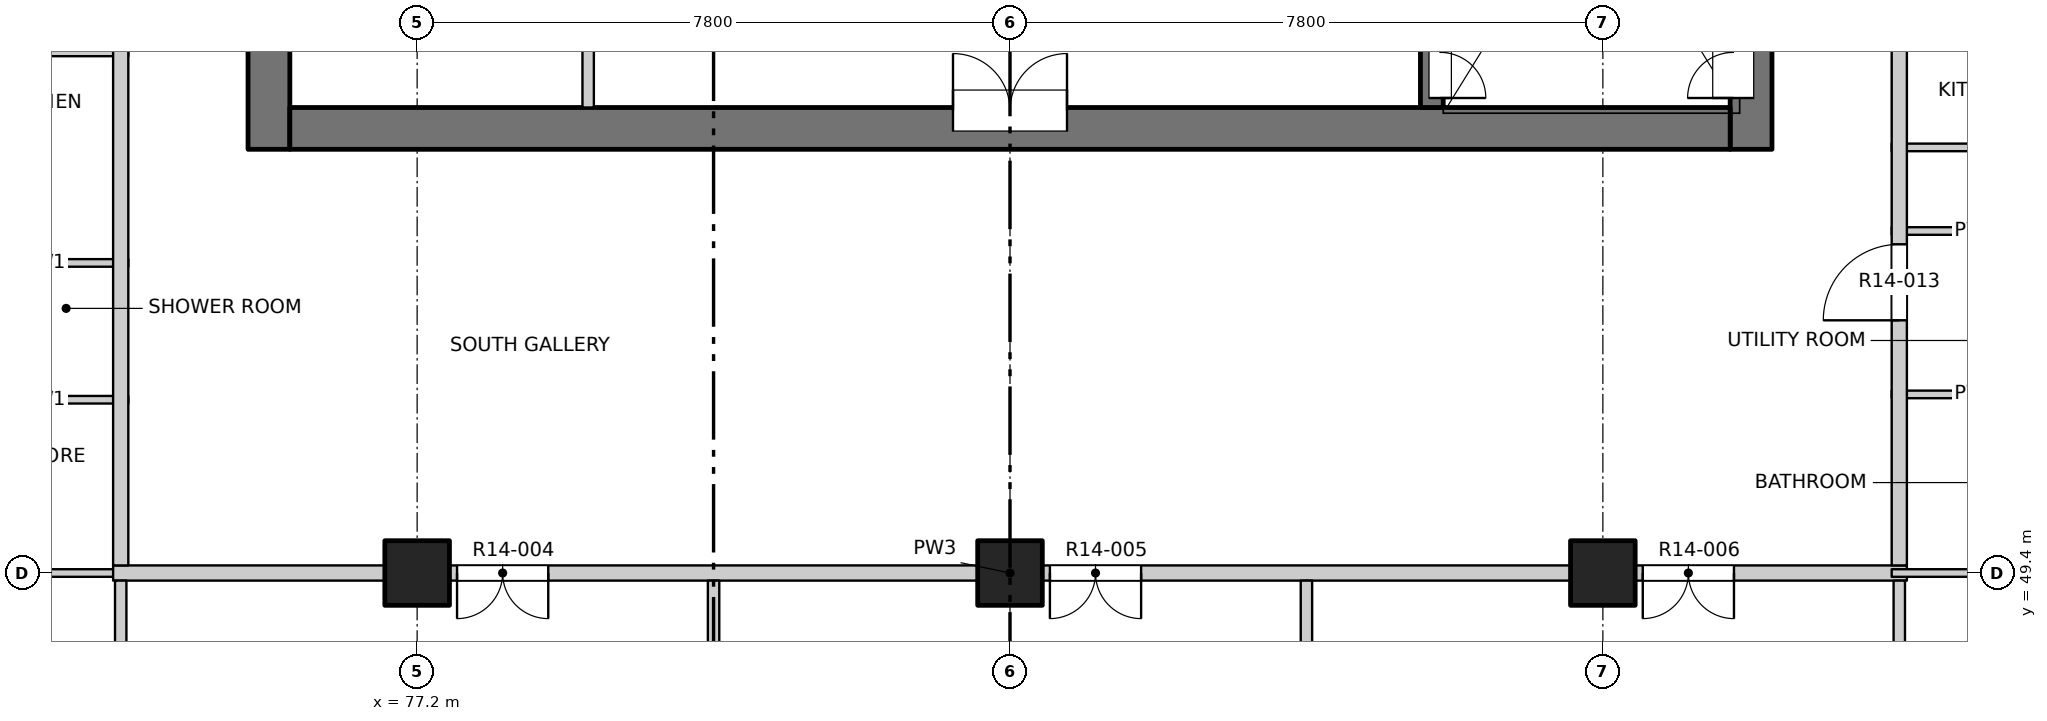
"""IFC4 building model, lengths in metres.
Left out: names, types, materials, properties, quantities, classifications, styles, units other than length and angle.
Written with IfcOpenShell. Run it as: python <this file> out.ifc"""

import sys

from ifc_helpers import new_model, si_unit, direction, frame, frame_2d, origin, origin_2d, place, context, subcontext, project, spatial, rectangle, extrude, element, fill, save


model = new_model("IFC4")
c1 = context("Model", 3, precision=1e-05, world=origin(), true_north=direction((0.0, 1.0)))
c2 = subcontext(c1, "Body", "Model", "MODEL_VIEW")
j1 = project(units=[si_unit("LENGTHUNIT", "METRE"), si_unit("PLANEANGLEUNIT", "RADIAN")], contexts=[c1])
p1 = place(None, origin())
s1 = spatial("IfcSite", under=j1, at=p1, CompositionType="ELEMENT")
p2 = place(p1, origin())
s2 = spatial("IfcBuilding", under=s1, at=p2, CompositionType="ELEMENT")
p3 = place(p2, frame((0.0, 0.0, 152.0)))
s3 = spatial("IfcBuildingStorey", under=s2, at=p3, CompositionType="ELEMENT", Elevation=152.0)
for number, where, z_axis, x_axis in (
    (1, (77.2, 49.4, -0.25), (0.0, 0.0, 1.0), (1.0, 0.0, 0.0)),
    (2, (85.0, 49.4, -0.25), (0.0, 0.0, 1.0), (1.0, 0.0, 0.0)),
    (3, (92.8, 49.4, -0.25), (0.0, 0.0, 1.0), (1.0, 0.0, 0.0)),
):
    element("IfcColumn", number, at=place(p3, frame(where, z_axis=z_axis, x_axis=x_axis)), inside=s3, PredefinedType="COLUMN", context=c2, shape_type="SweptSolid", body=[
        extrude(rectangle(XDim=0.85, YDim=0.85, at=origin_2d()), origin(), (0.0, 0.0, 1.0), 3.4),
    ])
p4 = place(p3, frame((75.25, 54.975, -0.25), z_axis=(0.0, 0.0, 1.0), x_axis=(0.0, 1.0, 0.0)))
e4 = element("IfcWall", 4, at=p4, inside=s3, PredefinedType="SOLIDWALL", context=c2, shape_type="SweptSolid", body=[
    extrude(rectangle(XDim=22.325, YDim=0.55, at=frame_2d((11.163, 0.0))), origin(), (0.0, 0.0, 1.0), 3.4),
])
p5 = place(p4, frame((7.475, 0.0, 0.25)))
e5 = element("IfcOpeningElement", 5, at=p5, cuts=e4, PredefinedType="OPENING", context=c2, shape_type="SweptSolid", body=[
    extrude(rectangle(XDim=0.9, YDim=2.1, at=frame_2d((0.45, 1.05))), frame((0.0, 0.285, 0.0), z_axis=(0.0, -1.0, 0.0), x_axis=(1.0, 0.0, 0.0)), (0.0, 0.0, 1.0), 0.57),
])
p6 = place(p4, frame((13.775, 0.0, 0.25)))
e6 = element("IfcOpeningElement", 6, at=p6, cuts=e4, PredefinedType="OPENING", context=c2, shape_type="SweptSolid", body=[
    extrude(rectangle(XDim=0.9, YDim=2.1, at=frame_2d((0.45, 1.05))), frame((0.0, 0.285, 0.0), z_axis=(0.0, -1.0, 0.0), x_axis=(1.0, 0.0, 0.0)), (0.0, 0.0, 1.0), 0.57),
])
p7 = place(p4, frame((20.075, 0.0, 0.25)))
e7 = element("IfcOpeningElement", 7, at=p7, cuts=e4, PredefinedType="OPENING", context=c2, shape_type="SweptSolid", body=[
    extrude(rectangle(XDim=0.9, YDim=2.1, at=frame_2d((0.45, 1.05))), frame((0.0, 0.285, 0.0), z_axis=(0.0, -1.0, 0.0), x_axis=(1.0, 0.0, 0.0)), (0.0, 0.0, 1.0), 0.57),
])
p8 = place(p3, frame((94.75, 54.975, -0.25), z_axis=(0.0, 0.0, 1.0), x_axis=(0.0, 1.0, 0.0)))
e8 = element("IfcWall", 8, at=p8, inside=s3, PredefinedType="SOLIDWALL", context=c2, shape_type="SweptSolid", body=[
    extrude(rectangle(XDim=6.975, YDim=0.55, at=frame_2d((3.487, 0.0))), origin(), (0.0, 0.0, 1.0), 3.4),
])
p9 = place(p8, frame((0.675, 0.0, 0.25)))
e9 = element("IfcOpeningElement", 9, at=p9, cuts=e8, PredefinedType="OPENING", context=c2, shape_type="SweptSolid", body=[
    extrude(rectangle(XDim=1.2, YDim=2.1, at=frame_2d((0.6, 1.05))), frame((0.0, 0.285, 0.0), z_axis=(0.0, -1.0, 0.0), x_axis=(1.0, 0.0, 0.0)), (0.0, 0.0, 1.0), 0.57),
])
p10 = place(p3, frame((75.525, 55.25, -0.25), z_axis=(0.0, 0.0, 1.0), x_axis=(1.0, 0.0, 0.0)))
e10 = element("IfcWall", 10, at=p10, inside=s3, PredefinedType="SOLIDWALL", context=c2, shape_type="SweptSolid", body=[
    extrude(rectangle(XDim=18.95, YDim=0.55, at=frame_2d((9.475, 0.0))), origin(), (0.0, 0.0, 1.0), 3.4),
])
p11 = place(p10, frame((8.725, 0.0, 0.25)))
e11 = element("IfcOpeningElement", 11, at=p11, cuts=e10, PredefinedType="OPENING", context=c2, shape_type="SweptSolid", body=[
    extrude(rectangle(XDim=1.5, YDim=2.1, at=frame_2d((0.75, 1.05))), frame((0.0, 0.285, 0.0), z_axis=(0.0, -1.0, 0.0), x_axis=(1.0, 0.0, 0.0)), (0.0, 0.0, 1.0), 0.57),
])
p12 = place(p3, frame((90.55, 55.525, -0.25), z_axis=(0.0, 0.0, 1.0), x_axis=(0.0, 1.0, 0.0)))
e12 = element("IfcWall", 12, at=p12, inside=s3, PredefinedType="SOLIDWALL", context=c2, shape_type="SweptSolid", body=[
    extrude(rectangle(XDim=6.425, YDim=0.3, at=frame_2d((3.212, 0.0))), origin(), (0.0, 0.0, 1.0), 3.4),
])
p13 = place(p12, frame((0.125, 0.0, 0.25)))
e13 = element("IfcOpeningElement", 13, at=p13, cuts=e12, PredefinedType="OPENING", context=c2, shape_type="SweptSolid", body=[
    extrude(rectangle(XDim=1.2, YDim=2.1, at=frame_2d((0.6, 1.05))), frame((0.0, 0.16, 0.0), z_axis=(0.0, -1.0, 0.0), x_axis=(1.0, 0.0, 0.0)), (0.0, 0.0, 1.0), 0.32),
])
p14 = place(p3, frame((65.8, 49.4, 0.0), z_axis=(0.0, 0.0, 1.0), x_axis=(1.0, 0.0, 0.0)))
e14 = element("IfcWall", 14, at=p14, inside=s3, PredefinedType="PARTITIONING", context=c2, shape_type="SweptSolid", body=[
    extrude(rectangle(XDim=7.6, YDim=0.1, at=frame_2d((3.8, 0.0))), origin(), (0.0, 0.0, 1.0), 3.15),
])
p15 = place(p14, frame((4.14, 0.0, 0.0)))
e15 = element("IfcOpeningElement", 15, at=p15, cuts=e14, PredefinedType="OPENING", context=c2, shape_type="SweptSolid", body=[
    extrude(rectangle(XDim=0.9, YDim=2.1, at=frame_2d((0.45, 1.05))), frame((0.0, 0.06, 0.0), z_axis=(0.0, -1.0, 0.0), x_axis=(1.0, 0.0, 0.0)), (0.0, 0.0, 1.0), 0.12),
])
p16 = place(p3, frame((73.2, 49.4, 0.0), z_axis=(0.0, 0.0, 1.0), x_axis=(1.0, 0.0, 0.0)))
e16 = element("IfcWall", 16, at=p16, inside=s3, PredefinedType="PARTITIONING", context=c2, shape_type="SweptSolid", body=[
    extrude(rectangle(XDim=23.6, YDim=0.2, at=frame_2d((11.8, 0.0))), origin(), (0.0, 0.0, 1.0), 3.15),
])
p17 = place(p16, frame((4.525, 0.0, 0.0)))
e17 = element("IfcOpeningElement", 17, at=p17, cuts=e16, PredefinedType="OPENING", context=c2, shape_type="SweptSolid", body=[
    extrude(rectangle(XDim=1.2, YDim=2.1, at=frame_2d((0.6, 1.05))), frame((0.0, 0.11, 0.0), z_axis=(0.0, -1.0, 0.0), x_axis=(1.0, 0.0, 0.0)), (0.0, 0.0, 1.0), 0.22),
])
p18 = place(p16, frame((12.325, 0.0, 0.0)))
e18 = element("IfcOpeningElement", 18, at=p18, cuts=e16, PredefinedType="OPENING", context=c2, shape_type="SweptSolid", body=[
    extrude(rectangle(XDim=1.2, YDim=2.1, at=frame_2d((0.6, 1.05))), frame((0.0, 0.11, 0.0), z_axis=(0.0, -1.0, 0.0), x_axis=(1.0, 0.0, 0.0)), (0.0, 0.0, 1.0), 0.22),
])
p19 = place(p16, frame((20.125, 0.0, 0.0)))
e19 = element("IfcOpeningElement", 19, at=p19, cuts=e16, PredefinedType="OPENING", context=c2, shape_type="SweptSolid", body=[
    extrude(rectangle(XDim=1.2, YDim=2.1, at=frame_2d((0.6, 1.05))), frame((0.0, 0.11, 0.0), z_axis=(0.0, -1.0, 0.0), x_axis=(1.0, 0.0, 0.0)), (0.0, 0.0, 1.0), 0.22),
])
p20 = place(p3, frame((96.6, 49.4, 0.0), z_axis=(0.0, 0.0, 1.0), x_axis=(1.0, 0.0, 0.0)))
e20 = element("IfcWall", 20, at=p20, inside=s3, PredefinedType="PARTITIONING", context=c2, shape_type="SweptSolid", body=[
    extrude(rectangle(XDim=7.6, YDim=0.1, at=frame_2d((3.8, 0.0))), origin(), (0.0, 0.0, 1.0), 3.15),
])
p21 = place(p20, frame((2.56, 0.0, 0.0)))
e21 = element("IfcOpeningElement", 21, at=p21, cuts=e20, PredefinedType="OPENING", context=c2, shape_type="SweptSolid", body=[
    extrude(rectangle(XDim=0.9, YDim=2.1, at=frame_2d((0.45, 1.05))), frame((0.0, 0.06, 0.0), z_axis=(0.0, -1.0, 0.0), x_axis=(1.0, 0.0, 0.0)), (0.0, 0.0, 1.0), 0.12),
])
for number, where, z_axis, x_axis in (
    (22, (71.18, 51.68, 0.0), (0.0, 0.0, 1.0), (1.0, 0.0, 0.0)),
    (23, (96.6, 51.75, 0.0), (0.0, 0.0, 1.0), (1.0, 0.0, 0.0)),
    (24, (71.18, 53.48, 0.0), (0.0, 0.0, 1.0), (1.0, 0.0, 0.0)),
    (25, (96.6, 53.9, 0.0), (0.0, 0.0, 1.0), (1.0, 0.0, 0.0)),
    (26, (96.6, 55.0, 0.0), (0.0, 0.0, 1.0), (1.0, 0.0, 0.0)),
    (27, (71.18, 56.25, 0.0), (0.0, 0.0, 1.0), (1.0, 0.0, 0.0)),
):
    element("IfcWall", number, at=place(p3, frame(where, z_axis=z_axis, x_axis=x_axis)), inside=s3, PredefinedType="PARTITIONING", context=c2, shape_type="SweptSolid", body=[
        extrude(rectangle(XDim=2.22, YDim=0.1, at=frame_2d((1.11, 0.0))), origin(), (0.0, 0.0, 1.0), 3.15),
    ])
p22 = place(p3, frame((73.3, 45.8, 0.0), z_axis=(0.0, 0.0, 1.0), x_axis=(0.0, 1.0, 0.0)))
e28 = element("IfcWall", 28, at=p22, inside=s3, PredefinedType="PARTITIONING", context=c2, shape_type="SweptSolid", body=[
    extrude(rectangle(XDim=3.5, YDim=0.15, at=frame_2d((1.75, 0.0))), origin(), (0.0, 0.0, 1.0), 3.15),
])
p23 = place(p3, frame((73.3, 49.5, 0.0), z_axis=(0.0, 0.0, 1.0), x_axis=(0.0, 1.0, 0.0)))
e29 = element("IfcWall", 29, at=p23, inside=s3, PredefinedType="PARTITIONING", context=c2, shape_type="SweptSolid", body=[
    extrude(rectangle(XDim=34.7, YDim=0.2, at=frame_2d((17.35, 0.0))), origin(), (0.0, 0.0, 1.0), 3.15),
])
p24 = place(p23, frame((10.125, 0.0, 0.0)))
e30 = element("IfcOpeningElement", 30, at=p24, cuts=e29, PredefinedType="OPENING", context=c2, shape_type="SweptSolid", body=[
    extrude(rectangle(XDim=1.0, YDim=2.1, at=frame_2d((0.5, 1.05))), frame((0.0, 0.11, 0.0), z_axis=(0.0, -1.0, 0.0), x_axis=(1.0, 0.0, 0.0)), (0.0, 0.0, 1.0), 0.22),
])
p25 = place(p23, frame((14.575, 0.0, 0.0)))
e31 = element("IfcOpeningElement", 31, at=p25, cuts=e29, PredefinedType="OPENING", context=c2, shape_type="SweptSolid", body=[
    extrude(rectangle(XDim=1.0, YDim=2.1, at=frame_2d((0.5, 1.05))), frame((0.0, 0.11, 0.0), z_axis=(0.0, -1.0, 0.0), x_axis=(1.0, 0.0, 0.0)), (0.0, 0.0, 1.0), 0.22),
])
p26 = place(p23, frame((26.575, 0.0, 0.0)))
e32 = element("IfcOpeningElement", 32, at=p26, cuts=e29, PredefinedType="OPENING", context=c2, shape_type="SweptSolid", body=[
    extrude(rectangle(XDim=1.0, YDim=2.1, at=frame_2d((0.5, 1.05))), frame((0.0, 0.11, 0.0), z_axis=(0.0, -1.0, 0.0), x_axis=(1.0, 0.0, 0.0)), (0.0, 0.0, 1.0), 0.22),
])
p27 = place(p3, frame((79.45, 55.525, 0.0), z_axis=(0.0, 0.0, 1.0), x_axis=(0.0, 1.0, 0.0)))
e33 = element("IfcWall", 33, at=p27, inside=s3, PredefinedType="PARTITIONING", context=c2, shape_type="SweptSolid", body=[
    extrude(rectangle(XDim=5.375, YDim=0.15, at=frame_2d((2.688, 0.0))), origin(), (0.0, 0.0, 1.0), 3.15),
])
p28 = place(p27, frame((2.175, 0.0, 0.0)))
e34 = element("IfcOpeningElement", 34, at=p28, cuts=e33, PredefinedType="OPENING", context=c2, shape_type="SweptSolid", body=[
    extrude(rectangle(XDim=0.9, YDim=2.1, at=frame_2d((0.45, 1.05))), frame((0.0, 0.085, 0.0), z_axis=(0.0, -1.0, 0.0), x_axis=(1.0, 0.0, 0.0)), (0.0, 0.0, 1.0), 0.17),
])
for number, where, z_axis, x_axis in (
    (35, (81.1, 45.8, 0.0), (0.0, 0.0, 1.0), (0.0, 1.0, 0.0)),
    (36, (88.9, 45.8, 0.0), (0.0, 0.0, 1.0), (0.0, 1.0, 0.0)),
    (37, (96.7, 45.8, 0.0), (0.0, 0.0, 1.0), (0.0, 1.0, 0.0)),
):
    element("IfcWall", number, at=place(p3, frame(where, z_axis=z_axis, x_axis=x_axis)), inside=s3, PredefinedType="PARTITIONING", context=c2, shape_type="SweptSolid", body=[
        extrude(rectangle(XDim=3.5, YDim=0.15, at=frame_2d((1.75, 0.0))), origin(), (0.0, 0.0, 1.0), 3.15),
    ])
p29 = place(p3, frame((96.7, 49.5, 0.0), z_axis=(0.0, 0.0, 1.0), x_axis=(0.0, 1.0, 0.0)))
e38 = element("IfcWall", 38, at=p29, inside=s3, PredefinedType="PARTITIONING", context=c2, shape_type="SweptSolid", body=[
    extrude(rectangle(XDim=34.7, YDim=0.2, at=frame_2d((17.35, 0.0))), origin(), (0.0, 0.0, 1.0), 3.15),
])
p30 = place(p29, frame((3.225, 0.0, 0.0)))
e39 = element("IfcOpeningElement", 39, at=p30, cuts=e38, PredefinedType="OPENING", context=c2, shape_type="SweptSolid", body=[
    extrude(rectangle(XDim=1.0, YDim=2.1, at=frame_2d((0.5, 1.05))), frame((0.0, 0.11, 0.0), z_axis=(0.0, -1.0, 0.0), x_axis=(1.0, 0.0, 0.0)), (0.0, 0.0, 1.0), 0.22),
])
p31 = place(p29, frame((19.775, 0.0, 0.0)))
e40 = element("IfcOpeningElement", 40, at=p31, cuts=e38, PredefinedType="OPENING", context=c2, shape_type="SweptSolid", body=[
    extrude(rectangle(XDim=1.0, YDim=2.1, at=frame_2d((0.5, 1.05))), frame((0.0, 0.11, 0.0), z_axis=(0.0, -1.0, 0.0), x_axis=(1.0, 0.0, 0.0)), (0.0, 0.0, 1.0), 0.22),
])
p32 = place(p29, frame((24.125, 0.0, 0.0)))
e41 = element("IfcOpeningElement", 41, at=p32, cuts=e38, PredefinedType="OPENING", context=c2, shape_type="SweptSolid", body=[
    extrude(rectangle(XDim=1.0, YDim=2.1, at=frame_2d((0.5, 1.05))), frame((0.0, 0.11, 0.0), z_axis=(0.0, -1.0, 0.0), x_axis=(1.0, 0.0, 0.0)), (0.0, 0.0, 1.0), 0.22),
])
p33 = place(p17, origin())
e42 = element("IfcDoor", 42, at=p33, inside=s3, OperationType="DOUBLE_DOOR_SINGLE_SWING", PredefinedType="DOOR", context=c2, shape_type="SweptSolid", body=[
    extrude(rectangle(XDim=1.2, YDim=2.1, at=frame_2d((0.6, 1.05))), frame((0.0, 0.025, 0.0), z_axis=(0.0, -1.0, 0.0), x_axis=(1.0, 0.0, 0.0)), (0.0, 0.0, 1.0), 0.05),
])
fill(e17, e42)
p34 = place(p18, origin())
e43 = element("IfcDoor", 43, at=p34, inside=s3, OperationType="DOUBLE_DOOR_SINGLE_SWING", PredefinedType="DOOR", context=c2, shape_type="SweptSolid", body=[
    extrude(rectangle(XDim=1.2, YDim=2.1, at=frame_2d((0.6, 1.05))), frame((0.0, 0.025, 0.0), z_axis=(0.0, -1.0, 0.0), x_axis=(1.0, 0.0, 0.0)), (0.0, 0.0, 1.0), 0.05),
])
fill(e18, e43)
p35 = place(p19, origin())
e44 = element("IfcDoor", 44, at=p35, inside=s3, OperationType="DOUBLE_DOOR_SINGLE_SWING", PredefinedType="DOOR", context=c2, shape_type="SweptSolid", body=[
    extrude(rectangle(XDim=1.2, YDim=2.1, at=frame_2d((0.6, 1.05))), frame((0.0, 0.025, 0.0), z_axis=(0.0, -1.0, 0.0), x_axis=(1.0, 0.0, 0.0)), (0.0, 0.0, 1.0), 0.05),
])
fill(e19, e44)
p36 = place(p30, origin())
e45 = element("IfcDoor", 45, at=p36, inside=s3, OperationType="SINGLE_SWING_RIGHT", PredefinedType="DOOR", context=c2, shape_type="SweptSolid", body=[
    extrude(rectangle(XDim=1.0, YDim=2.1, at=frame_2d((0.5, 1.05))), frame((0.0, 0.025, 0.0), z_axis=(0.0, -1.0, 0.0), x_axis=(1.0, 0.0, 0.0)), (0.0, 0.0, 1.0), 0.05),
])
fill(e39, e45)
p37 = place(p11, origin())
e46 = element("IfcDoor", 46, at=p37, inside=s3, OperationType="DOUBLE_DOOR_SINGLE_SWING", PredefinedType="DOOR", context=c2, shape_type="SweptSolid", body=[
    extrude(rectangle(XDim=1.5, YDim=2.1, at=frame_2d((0.75, 1.05))), frame((0.0, 0.26, 0.0), z_axis=(0.0, -1.0, 0.0), x_axis=(1.0, 0.0, 0.0)), (0.0, 0.0, 1.0), 0.05),
])
fill(e11, e46)
p38 = place(p13, origin())
e47 = element("IfcDoor", 47, at=p38, inside=s3, OperationType="DOUBLE_DOOR_SINGLE_SWING", PredefinedType="DOOR", context=c2, shape_type="SweptSolid", body=[
    extrude(rectangle(XDim=1.2, YDim=2.1, at=frame_2d((0.6, 1.05))), frame((0.0, -0.085, 0.0), z_axis=(0.0, -1.0, 0.0), x_axis=(1.0, 0.0, 0.0)), (0.0, 0.0, 1.0), 0.05),
])
fill(e13, e47)
p39 = place(p9, origin())
e48 = element("IfcDoor", 48, at=p39, inside=s3, OperationType="DOUBLE_DOOR_SINGLE_SWING", PredefinedType="DOOR", context=c2, shape_type="SweptSolid", body=[
    extrude(rectangle(XDim=1.2, YDim=2.1, at=frame_2d((0.6, 1.05))), frame((0.0, 0.26, 0.0), z_axis=(0.0, -1.0, 0.0), x_axis=(1.0, 0.0, 0.0)), (0.0, 0.0, 1.0), 0.05),
])
fill(e9, e48)
save(model, sys.argv[1])
